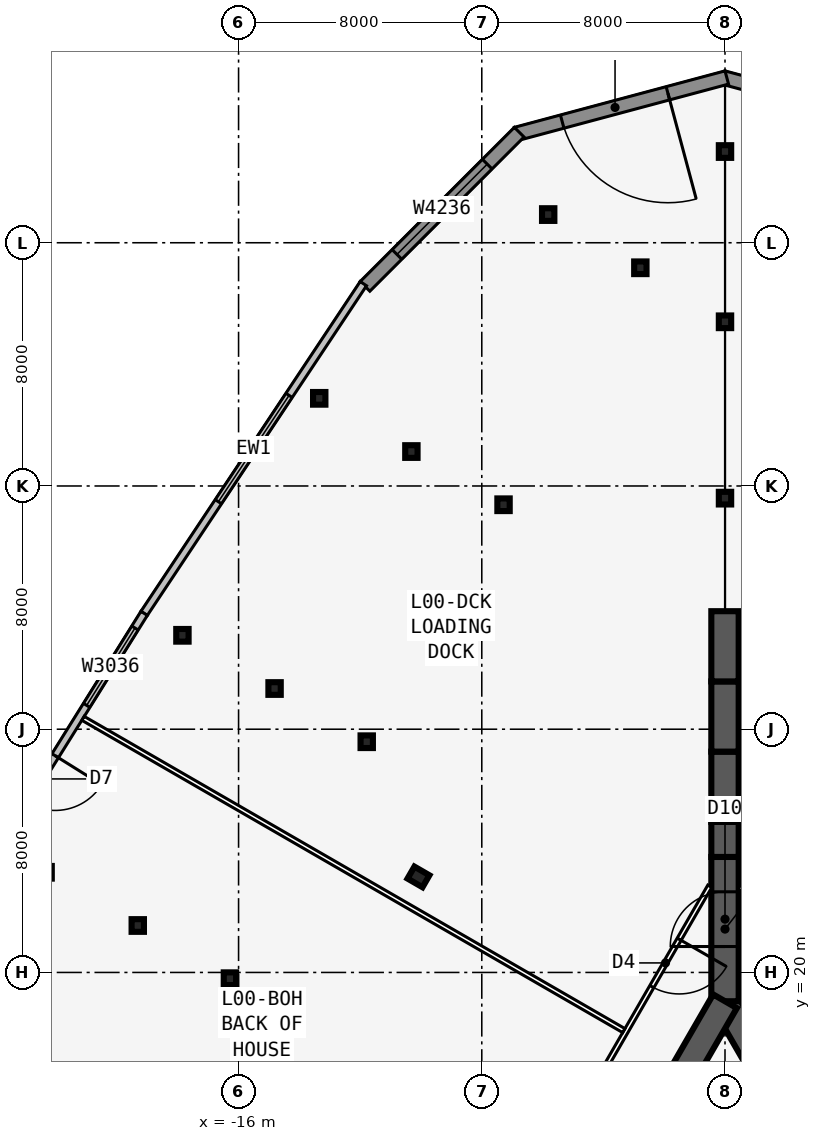
"""IFC4 building model, lengths in metres.
Left out: names, types, materials, properties, quantities, classifications, styles, units other than length and angle.
Written with IfcOpenShell. Run it as: python <this file> out.ifc"""

import sys

from ifc_helpers import new_model, si_unit, direction, frame, frame_2d, origin, origin_2d, place, context, subcontext, project, spatial, rectangle, i_section, extrude, element, fill, save


model = new_model("IFC4")
c1 = context("Model", 3, precision=1e-05, world=origin(), true_north=direction((0.0, 1.0)))
c2 = subcontext(c1, "Body", "Model", "MODEL_VIEW")
j1 = project(units=[si_unit("LENGTHUNIT", "METRE"), si_unit("PLANEANGLEUNIT", "RADIAN")], contexts=[c1])
p1 = place(None, origin())
s1 = spatial("IfcSite", under=j1, at=p1, CompositionType="ELEMENT")
p2 = place(p1, origin())
s2 = spatial("IfcBuilding", under=s1, at=p2, CompositionType="ELEMENT")
p3 = place(p2, origin())
s3 = spatial("IfcBuildingStorey", under=s2, at=p3, CompositionType="ELEMENT", Elevation=0.0)
p4 = place(p3, frame((16.5, -9.526, -0.3), z_axis=(0.0, 0.0, 1.0), x_axis=(-0.499999749417, 0.866025548458, 0.0)))
e1 = element("IfcWall", 1, at=p4, inside=s3, PredefinedType="SHEAR", context=c2, shape_type="SweptSolid", body=[
    extrude(rectangle(XDim=33.0, YDim=0.9, at=frame_2d((16.5, 0.0))), origin(), (0.0, 0.0, 1.0), 6.3),
])
p5 = place(p4, frame((14.15, 0.0, 0.3)))
e2 = element("IfcOpeningElement", 2, at=p5, cuts=e1, PredefinedType="OPENING", context=c2, shape_type="SweptSolid", body=[
    extrude(rectangle(XDim=1.8, YDim=2.13, at=frame_2d((0.9, 1.065))), frame((0.0, 0.46, 0.0), z_axis=(0.0, -1.0, 0.0), x_axis=(1.0, 0.0, 0.0)), (0.0, 0.0, 1.0), 0.92),
])
p6 = place(p4, frame((12.6, 0.0, 0.3)))
e3 = element("IfcOpeningElement", 3, at=p6, cuts=e1, PredefinedType="OPENING", context=c2, shape_type="SweptSolid", body=[
    extrude(rectangle(XDim=1.0, YDim=2.13, at=frame_2d((0.5, 1.065))), frame((0.0, 0.46, 0.0), z_axis=(0.0, -1.0, 0.0), x_axis=(1.0, 0.0, 0.0)), (0.0, 0.0, 1.0), 0.92),
])
p7 = place(p3, frame((0.0, 19.052, -0.3), z_axis=(0.0, 0.0, 1.0), x_axis=(-0.499999749417, -0.866025548458, 0.0)))
e4 = element("IfcWall", 4, at=p7, inside=s3, PredefinedType="SHEAR", context=c2, shape_type="SweptSolid", body=[
    extrude(rectangle(XDim=33.0, YDim=0.9, at=frame_2d((16.5, 0.0))), origin(), (0.0, 0.0, 1.0), 6.3),
])
p8 = place(p7, frame((14.15, 0.0, 0.3)))
e5 = element("IfcOpeningElement", 5, at=p8, cuts=e4, PredefinedType="OPENING", context=c2, shape_type="SweptSolid", body=[
    extrude(rectangle(XDim=1.8, YDim=2.13, at=frame_2d((0.9, 1.065))), frame((0.0, 0.46, 0.0), z_axis=(0.0, -1.0, 0.0), x_axis=(1.0, 0.0, 0.0)), (0.0, 0.0, 1.0), 0.92),
])
p9 = place(p7, frame((12.6, 0.0, 0.3)))
e6 = element("IfcOpeningElement", 6, at=p9, cuts=e4, PredefinedType="OPENING", context=c2, shape_type="SweptSolid", body=[
    extrude(rectangle(XDim=1.0, YDim=2.13, at=frame_2d((0.5, 1.065))), frame((0.0, 0.46, 0.0), z_axis=(0.0, -1.0, 0.0), x_axis=(1.0, 0.0, 0.0)), (0.0, 0.0, 1.0), 0.92),
])
p10 = place(p3, frame((0.0, 19.052, -0.3), z_axis=(0.0, 0.0, 1.0), x_axis=(0.0, 1.0, 0.0)))
e7 = element("IfcWall", 7, at=p10, inside=s3, PredefinedType="SHEAR", context=c2, shape_type="SweptSolid", body=[
    extrude(rectangle(XDim=4.746, YDim=0.9, at=frame_2d((2.373, 0.0))), origin(), (0.0, 0.0, 1.0), 6.3),
])
p11 = place(p10, frame((1.8, 0.0, 0.3)))
e8 = element("IfcOpeningElement", 8, at=p11, cuts=e7, PredefinedType="OPENING", context=c2, shape_type="SweptSolid", body=[
    extrude(rectangle(XDim=1.8, YDim=2.13, at=frame_2d((0.9, 1.065))), frame((0.0, 0.46, 0.0), z_axis=(0.0, -1.0, 0.0), x_axis=(1.0, 0.0, 0.0)), (0.0, 0.0, 1.0), 0.92),
])
p12 = place(p3, frame((0.0, 23.799, -0.3), z_axis=(0.0, 0.0, 1.0), x_axis=(0.0, 1.0, 0.0)))
e9 = element("IfcWall", 9, at=p12, inside=s3, PredefinedType="SHEAR", context=c2, shape_type="SweptSolid", body=[
    extrude(rectangle(XDim=1.155, YDim=0.9, at=frame_2d((0.577, 0.0))), origin(), (0.0, 0.0, 1.0), 6.3),
])
p13 = place(p3, frame((0.0, 24.953, -0.3), z_axis=(0.0, 0.0, 1.0), x_axis=(0.0, 1.0, 0.0)))
e10 = element("IfcWall", 10, at=p13, inside=s3, PredefinedType="SHEAR", context=c2, shape_type="SweptSolid", body=[
    extrude(rectangle(XDim=2.309, YDim=0.9, at=frame_2d((1.155, 0.0))), origin(), (0.0, 0.0, 1.0), 6.3),
])
p14 = place(p3, frame((0.0, 27.263, -0.3), z_axis=(0.0, 0.0, 1.0), x_axis=(0.0, 1.0, 0.0)))
e11 = element("IfcWall", 11, at=p14, inside=s3, PredefinedType="SHEAR", context=c2, shape_type="SweptSolid", body=[
    extrude(rectangle(XDim=2.31, YDim=0.9, at=frame_2d((1.155, 0.0))), origin(), (0.0, 0.0, 1.0), 6.3),
])
p15 = place(p3, frame((0.0, 29.572, -0.3), z_axis=(0.0, 0.0, 1.0), x_axis=(0.0, 1.0, 0.0)))
e12 = element("IfcWall", 12, at=p15, inside=s3, PredefinedType="SHEAR", context=c2, shape_type="SweptSolid", body=[
    extrude(rectangle(XDim=2.309, YDim=0.9, at=frame_2d((1.155, 0.0))), origin(), (0.0, 0.0, 1.0), 6.3),
])
p16 = place(p3, frame((-10.083, 23.142, -0.3), z_axis=(0.0, 0.0, 1.0), x_axis=(-0.5, -0.866025403784, 0.0)))
e13 = element("IfcColumn", 13, at=p16, inside=s3, PredefinedType="COLUMN", context=c2, shape_type="SweptSolid", body=[
    extrude(i_section(OverallWidth=0.455, OverallDepth=0.569, WebThickness=0.078, FlangeThickness=0.125, at=origin_2d()), origin(), (0.0, 0.0, 1.0), 6.3),
])
for number, where, z_axis, x_axis in (
    (14, (0.0, 35.6, -0.3), (0.0, 0.0, 1.0), (1.0, 0.0, 0.0)),
    (15, (0.0, 41.4, -0.3), (0.0, 0.0, 1.0), (1.0, 0.0, 0.0)),
    (16, (0.0, 47.0, -0.3), (0.0, 0.0, 1.0), (1.0, 0.0, 0.0)),
    (17, (-11.785, 27.588, -0.3), (0.0, 0.0, 1.0), (1.0, 0.0, 0.0)),
    (18, (-7.285, 35.383, -0.3), (0.0, 0.0, 1.0), (1.0, 0.0, 0.0)),
    (19, (-2.785, 43.177, -0.3), (0.0, 0.0, 1.0), (1.0, 0.0, 0.0)),
    (20, (-16.285, 19.794, -0.3), (0.0, 0.0, 1.0), (1.0, 0.0, 0.0)),
    (21, (-14.816, 29.338, -0.3), (0.0, 0.0, 1.0), (1.0, 0.0, 0.0)),
    (22, (-10.316, 37.133, -0.3), (0.0, 0.0, 1.0), (1.0, 0.0, 0.0)),
    (23, (-5.816, 44.927, -0.3), (0.0, 0.0, 1.0), (1.0, 0.0, 0.0)),
    (24, (-19.316, 21.544, -0.3), (0.0, 0.0, 1.0), (1.0, 0.0, 0.0)),
    (25, (-17.847, 31.088, -0.3), (0.0, 0.0, 1.0), (1.0, 0.0, 0.0)),
    (26, (-13.347, 38.883, -0.3), (0.0, 0.0, 1.0), (1.0, 0.0, 0.0)),
):
    element("IfcColumn", number, at=place(p3, frame(where, z_axis=z_axis, x_axis=x_axis)), inside=s3, PredefinedType="COLUMN", context=c2, shape_type="SweptSolid", body=[
        extrude(i_section(OverallWidth=0.406, OverallDepth=0.417, WebThickness=0.03, FlangeThickness=0.048, at=origin_2d()), origin(), (0.0, 0.0, 1.0), 6.3),
    ])
p17 = place(p3, frame((6.87, 47.578, -0.3), z_axis=(0.0, 0.0, 1.0), x_axis=(-0.965924653531, 0.258823421857, 0.0)))
e27 = element("IfcWall", 27, at=p17, inside=s3, PredefinedType="SOLIDWALL", context=c2, shape_type="SweptSolid", body=[
    extrude(rectangle(XDim=7.173, YDim=0.45, at=frame_2d((3.586, 0.0))), origin(), (0.0, 0.0, 1.0), 6.05),
])
p18 = place(p17, frame((1.268, 0.0, 1.2)))
e28 = element("IfcOpeningElement", 28, at=p18, cuts=e27, PredefinedType="OPENING", context=c2, shape_type="SweptSolid", body=[
    extrude(rectangle(XDim=4.2, YDim=3.6, at=frame_2d((2.1, 1.8))), frame((0.0, 0.235, 0.0), z_axis=(0.0, -1.0, 0.0), x_axis=(1.0, 0.0, 0.0)), (0.0, 0.0, 1.0), 0.47),
])
p19 = place(p3, frame((0.058, 49.435, -0.3), z_axis=(0.0, 0.0, 1.0), x_axis=(-0.965924653531, -0.258823421857, 0.0)))
e29 = element("IfcWall", 29, at=p19, inside=s3, PredefinedType="SOLIDWALL", context=c2, shape_type="SweptSolid", body=[
    extrude(rectangle(XDim=7.173, YDim=0.45, at=frame_2d((3.586, 0.0))), origin(), (0.0, 0.0, 1.0), 6.05),
])
p20 = place(p19, frame((2.004, 0.0, 0.3)))
e30 = element("IfcOpeningElement", 30, at=p20, cuts=e29, PredefinedType="OPENING", context=c2, shape_type="SweptSolid", body=[
    extrude(rectangle(XDim=3.6, YDim=4.2, at=frame_2d((1.8, 2.1))), frame((0.0, 0.235, 0.0), z_axis=(0.0, -1.0, 0.0), x_axis=(1.0, 0.0, 0.0)), (0.0, 0.0, 1.0), 0.47),
])
p21 = place(p3, frame((-6.769, 47.637, -0.3), z_axis=(0.0, 0.0, 1.0), x_axis=(-0.707089762358, -0.707123799605, 0.0)))
e31 = element("IfcWall", 31, at=p21, inside=s3, PredefinedType="SOLIDWALL", context=c2, shape_type="SweptSolid", body=[
    extrude(rectangle(XDim=7.173, YDim=0.45, at=frame_2d((3.586, 0.0))), origin(), (0.0, 0.0, 1.0), 6.05),
])
p22 = place(p21, frame((1.486, 0.0, 1.2)))
e32 = element("IfcOpeningElement", 32, at=p22, cuts=e31, PredefinedType="OPENING", context=c2, shape_type="SweptSolid", body=[
    extrude(rectangle(XDim=4.2, YDim=3.6, at=frame_2d((2.1, 1.8))), frame((0.0, 0.235, 0.0), z_axis=(0.0, -1.0, 0.0), x_axis=(1.0, 0.0, 0.0)), (0.0, 0.0, 1.0), 0.47),
])
p23 = place(p3, frame((-11.896, 42.655, -0.3), z_axis=(0.0, 0.0, 1.0), x_axis=(-0.553640063994, -0.832756074454, 0.0)))
e33 = element("IfcWall", 33, at=p23, inside=s3, PredefinedType="STANDARD", context=c2, shape_type="SweptSolid", body=[
    extrude(rectangle(XDim=13.026, YDim=0.25, at=frame_2d((6.513, 0.0))), origin(), (0.0, 0.0, 1.0), 6.05),
])
p24 = place(p23, frame((4.413, 0.0, 1.2)))
e34 = element("IfcOpeningElement", 34, at=p24, cuts=e33, PredefinedType="OPENING", context=c2, shape_type="SweptSolid", body=[
    extrude(rectangle(XDim=4.2, YDim=3.6, at=frame_2d((2.1, 1.8))), frame((0.0, 0.135, 0.0), z_axis=(0.0, -1.0, 0.0), x_axis=(1.0, 0.0, 0.0)), (0.0, 0.0, 1.0), 0.27),
])
p25 = place(p3, frame((-19.106, 31.81, -0.3), z_axis=(0.0, 0.0, 1.0), x_axis=(-0.529864906428, -0.848082060261, 0.0)))
e35 = element("IfcWall", 35, at=p25, inside=s3, PredefinedType="STANDARD", context=c2, shape_type="SweptSolid", body=[
    extrude(rectangle(XDim=9.006, YDim=0.25, at=frame_2d((4.503, 0.0))), origin(), (0.0, 0.0, 1.0), 6.05),
])
p26 = place(p25, frame((0.568, 0.0, 1.2)))
e36 = element("IfcOpeningElement", 36, at=p26, cuts=e35, PredefinedType="OPENING", context=c2, shape_type="SweptSolid", body=[
    extrude(rectangle(XDim=3.0, YDim=3.6, at=frame_2d((1.5, 1.8))), frame((0.0, 0.135, 0.0), z_axis=(0.0, -1.0, 0.0), x_axis=(1.0, 0.0, 0.0)), (0.0, 0.0, 1.0), 0.27),
])
p27 = place(p25, frame((5.521, 0.0, 0.3)))
e37 = element("IfcOpeningElement", 37, at=p27, cuts=e35, PredefinedType="OPENING", context=c2, shape_type="SweptSolid", body=[
    extrude(rectangle(XDim=1.8, YDim=2.7, at=frame_2d((0.9, 1.35))), frame((0.0, 0.135, 0.0), z_axis=(0.0, -1.0, 0.0), x_axis=(1.0, 0.0, 0.0)), (0.0, 0.0, 1.0), 0.27),
])
p28 = place(p3, frame((20.027, -10.985, -0.3), z_axis=(0.0, 0.0, 1.0), x_axis=(-0.500001677587, 0.866024435227, 0.0)))
e38 = element("IfcWall", 38, at=p28, inside=s3, PredefinedType="PARTITIONING", context=c2, shape_type="SweptSolid", body=[
    extrude(rectangle(XDim=39.054, YDim=0.15, at=frame_2d((19.527, 0.0))), origin(), (0.0, 0.0, 1.0), 5.108),
])
p29 = place(p28, frame((8.427, 0.0, 0.3)))
e39 = element("IfcOpeningElement", 39, at=p29, cuts=e38, PredefinedType="OPENING", context=c2, shape_type="SweptSolid", body=[
    extrude(rectangle(XDim=1.8, YDim=2.13, at=frame_2d((0.9, 1.065))), frame((0.0, 0.085, 0.0), z_axis=(0.0, -1.0, 0.0), x_axis=(1.0, 0.0, 0.0)), (0.0, 0.0, 1.0), 0.17),
])
p30 = place(p28, frame((18.427, 0.0, 0.3)))
e40 = element("IfcOpeningElement", 40, at=p30, cuts=e38, PredefinedType="OPENING", context=c2, shape_type="SweptSolid", body=[
    extrude(rectangle(XDim=1.8, YDim=2.13, at=frame_2d((0.9, 1.065))), frame((0.0, 0.085, 0.0), z_axis=(0.0, -1.0, 0.0), x_axis=(1.0, 0.0, 0.0)), (0.0, 0.0, 1.0), 0.17),
])
p31 = place(p28, frame((23.227, 0.0, 0.3)))
e41 = element("IfcOpeningElement", 41, at=p31, cuts=e38, PredefinedType="OPENING", context=c2, shape_type="SweptSolid", body=[
    extrude(rectangle(XDim=1.8, YDim=2.13, at=frame_2d((0.9, 1.065))), frame((0.0, 0.085, 0.0), z_axis=(0.0, -1.0, 0.0), x_axis=(1.0, 0.0, 0.0)), (0.0, 0.0, 1.0), 0.17),
])
p32 = place(p28, frame((27.627, 0.0, 0.3)))
e42 = element("IfcOpeningElement", 42, at=p32, cuts=e38, PredefinedType="OPENING", context=c2, shape_type="SweptSolid", body=[
    extrude(rectangle(XDim=1.0, YDim=2.13, at=frame_2d((0.5, 1.065))), frame((0.0, 0.085, 0.0), z_axis=(0.0, -1.0, 0.0), x_axis=(1.0, 0.0, 0.0)), (0.0, 0.0, 1.0), 0.17),
])
p33 = place(p28, frame((30.527, 0.0, 0.3)))
e43 = element("IfcOpeningElement", 43, at=p33, cuts=e38, PredefinedType="OPENING", context=c2, shape_type="SweptSolid", body=[
    extrude(rectangle(XDim=1.0, YDim=2.13, at=frame_2d((0.5, 1.065))), frame((0.0, 0.085, 0.0), z_axis=(0.0, -1.0, 0.0), x_axis=(1.0, 0.0, 0.0)), (0.0, 0.0, 1.0), 0.17),
])
p34 = place(p28, frame((33.277, 0.0, 0.3)))
e44 = element("IfcOpeningElement", 44, at=p34, cuts=e38, PredefinedType="OPENING", context=c2, shape_type="SweptSolid", body=[
    extrude(rectangle(XDim=1.0, YDim=2.13, at=frame_2d((0.5, 1.065))), frame((0.0, 0.085, 0.0), z_axis=(0.0, -1.0, 0.0), x_axis=(1.0, 0.0, 0.0)), (0.0, 0.0, 1.0), 0.17),
])
p35 = place(p28, frame((36.39, 0.0, 0.3)))
e45 = element("IfcOpeningElement", 45, at=p35, cuts=e38, PredefinedType="OPENING", context=c2, shape_type="SweptSolid", body=[
    extrude(rectangle(XDim=1.0, YDim=2.13, at=frame_2d((0.5, 1.065))), frame((0.0, 0.085, 0.0), z_axis=(0.0, -1.0, 0.0), x_axis=(1.0, 0.0, 0.0)), (0.0, 0.0, 1.0), 0.17),
])
p36 = place(p3, frame((-0.5, 22.836, -0.3), z_axis=(0.0, 0.0, 1.0), x_axis=(-0.500001677587, -0.866024435227, 0.0)))
e46 = element("IfcWall", 46, at=p36, inside=s3, PredefinedType="PARTITIONING", context=c2, shape_type="SweptSolid", body=[
    extrude(rectangle(XDim=39.054, YDim=0.15, at=frame_2d((19.527, 0.0))), origin(), (0.0, 0.0, 1.0), 5.108),
])
p37 = place(p36, frame((2.013, 0.0, 0.3)))
e47 = element("IfcOpeningElement", 47, at=p37, cuts=e46, PredefinedType="OPENING", context=c2, shape_type="SweptSolid", body=[
    extrude(rectangle(XDim=1.8, YDim=2.13, at=frame_2d((0.9, 1.065))), frame((0.0, 0.085, 0.0), z_axis=(0.0, -1.0, 0.0), x_axis=(1.0, 0.0, 0.0)), (0.0, 0.0, 1.0), 0.17),
])
p38 = place(p36, frame((10.427, 0.0, 0.3)))
e48 = element("IfcOpeningElement", 48, at=p38, cuts=e46, PredefinedType="OPENING", context=c2, shape_type="SweptSolid", body=[
    extrude(rectangle(XDim=1.8, YDim=2.13, at=frame_2d((0.9, 1.065))), frame((0.0, 0.085, 0.0), z_axis=(0.0, -1.0, 0.0), x_axis=(1.0, 0.0, 0.0)), (0.0, 0.0, 1.0), 0.17),
])
p39 = place(p36, frame((18.427, 0.0, 0.3)))
e49 = element("IfcOpeningElement", 49, at=p39, cuts=e46, PredefinedType="OPENING", context=c2, shape_type="SweptSolid", body=[
    extrude(rectangle(XDim=1.8, YDim=2.13, at=frame_2d((0.9, 1.065))), frame((0.0, 0.085, 0.0), z_axis=(0.0, -1.0, 0.0), x_axis=(1.0, 0.0, 0.0)), (0.0, 0.0, 1.0), 0.17),
])
p40 = place(p36, frame((23.227, 0.0, 0.3)))
e50 = element("IfcOpeningElement", 50, at=p40, cuts=e46, PredefinedType="OPENING", context=c2, shape_type="SweptSolid", body=[
    extrude(rectangle(XDim=1.8, YDim=2.13, at=frame_2d((0.9, 1.065))), frame((0.0, 0.085, 0.0), z_axis=(0.0, -1.0, 0.0), x_axis=(1.0, 0.0, 0.0)), (0.0, 0.0, 1.0), 0.17),
])
p41 = place(p36, frame((27.627, 0.0, 0.3)))
e51 = element("IfcOpeningElement", 51, at=p41, cuts=e46, PredefinedType="OPENING", context=c2, shape_type="SweptSolid", body=[
    extrude(rectangle(XDim=1.0, YDim=2.13, at=frame_2d((0.5, 1.065))), frame((0.0, 0.085, 0.0), z_axis=(0.0, -1.0, 0.0), x_axis=(1.0, 0.0, 0.0)), (0.0, 0.0, 1.0), 0.17),
])
p42 = place(p36, frame((30.277, 0.0, 0.3)))
e52 = element("IfcOpeningElement", 52, at=p42, cuts=e46, PredefinedType="OPENING", context=c2, shape_type="SweptSolid", body=[
    extrude(rectangle(XDim=1.0, YDim=2.13, at=frame_2d((0.5, 1.065))), frame((0.0, 0.085, 0.0), z_axis=(0.0, -1.0, 0.0), x_axis=(1.0, 0.0, 0.0)), (0.0, 0.0, 1.0), 0.17),
])
p43 = place(p36, frame((34.89, 0.0, 0.3)))
e53 = element("IfcOpeningElement", 53, at=p43, cuts=e46, PredefinedType="OPENING", context=c2, shape_type="SweptSolid", body=[
    extrude(rectangle(XDim=1.0, YDim=2.13, at=frame_2d((0.5, 1.065))), frame((0.0, 0.085, 0.0), z_axis=(0.0, -1.0, 0.0), x_axis=(1.0, 0.0, 0.0)), (0.0, 0.0, 1.0), 0.17),
])
p44 = place(p3, frame((-3.329, 18.087, -0.3), z_axis=(0.0, 0.0, 1.0), x_axis=(-0.866020300771, 0.500008838574, 0.0)))
e54 = element("IfcWall", 54, at=p44, inside=s3, PredefinedType="PARTITIONING", context=c2, shape_type="SweptSolid", body=[
    extrude(rectangle(XDim=20.539, YDim=0.15, at=frame_2d((10.27, 0.0))), origin(), (0.0, 0.0, 1.0), 6.05),
])
p45 = place(p3, frame((-9.128, 8.042, -0.3), z_axis=(0.0, 0.0, 1.0), x_axis=(-0.866022493458, 0.5000050408, 0.0)))
e55 = element("IfcWall", 55, at=p45, inside=s3, PredefinedType="PARTITIONING", context=c2, shape_type="SweptSolid", body=[
    extrude(rectangle(XDim=20.79, YDim=0.15, at=frame_2d((10.395, 0.0))), origin(), (0.0, 0.0, 1.0), 6.05),
])
p46 = place(p20, origin())
e56 = element("IfcDoor", 56, at=p46, inside=s3, OperationType="ROLLINGUP", PredefinedType="DOOR", context=c2, shape_type="SweptSolid", body=[
    extrude(rectangle(XDim=3.6, YDim=4.2, at=frame_2d((1.8, 2.1))), frame((0.0, 0.025, 0.0), z_axis=(0.0, -1.0, 0.0), x_axis=(1.0, 0.0, 0.0)), (0.0, 0.0, 1.0), 0.05),
])
fill(e30, e56)
p47 = place(p22, origin())
e57 = element("IfcWindow", 57, at=p47, inside=s3, PartitioningType="SINGLE_PANEL", PredefinedType="WINDOW", context=c2, shape_type="SweptSolid", body=[
    extrude(rectangle(XDim=4.2, YDim=3.6, at=frame_2d((2.1, 1.8))), frame((0.0, 0.03, 0.0), z_axis=(0.0, -1.0, 0.0), x_axis=(1.0, 0.0, 0.0)), (0.0, 0.0, 1.0), 0.06),
])
fill(e32, e57)
p48 = place(p24, origin())
e58 = element("IfcWindow", 58, at=p48, inside=s3, PartitioningType="SINGLE_PANEL", PredefinedType="WINDOW", context=c2, shape_type="SweptSolid", body=[
    extrude(rectangle(XDim=4.2, YDim=3.6, at=frame_2d((2.1, 1.8))), frame((0.0, 0.03, 0.0), z_axis=(0.0, -1.0, 0.0), x_axis=(1.0, 0.0, 0.0)), (0.0, 0.0, 1.0), 0.06),
])
fill(e34, e58)
p49 = place(p26, origin())
e59 = element("IfcWindow", 59, at=p49, inside=s3, PartitioningType="SINGLE_PANEL", PredefinedType="WINDOW", context=c2, shape_type="SweptSolid", body=[
    extrude(rectangle(XDim=3.0, YDim=3.6, at=frame_2d((1.5, 1.8))), frame((0.0, 0.03, 0.0), z_axis=(0.0, -1.0, 0.0), x_axis=(1.0, 0.0, 0.0)), (0.0, 0.0, 1.0), 0.06),
])
fill(e36, e59)
p50 = place(p27, origin())
e60 = element("IfcDoor", 60, at=p50, inside=s3, OperationType="DOUBLE_DOOR_SINGLE_SWING", PredefinedType="DOOR", context=c2, shape_type="SweptSolid", body=[
    extrude(rectangle(XDim=1.8, YDim=2.7, at=frame_2d((0.9, 1.35))), frame((0.0, 0.025, 0.0), z_axis=(0.0, -1.0, 0.0), x_axis=(1.0, 0.0, 0.0)), (0.0, 0.0, 1.0), 0.05),
])
fill(e37, e60)
p51 = place(p37, origin())
e61 = element("IfcDoor", 61, at=p51, inside=s3, OperationType="DOUBLE_DOOR_SINGLE_SWING", PredefinedType="DOOR", context=c2, shape_type="SweptSolid", body=[
    extrude(rectangle(XDim=1.8, YDim=2.13, at=frame_2d((0.9, 1.065))), frame((0.0, 0.025, 0.0), z_axis=(0.0, -1.0, 0.0), x_axis=(1.0, 0.0, 0.0)), (0.0, 0.0, 1.0), 0.05),
])
fill(e47, e61)
p52 = place(p11, origin())
e62 = element("IfcDoor", 62, at=p52, inside=s3, OperationType="DOUBLE_DOOR_DOUBLE_SWING", PredefinedType="DOOR", context=c2, shape_type="SweptSolid", body=[
    extrude(rectangle(XDim=1.8, YDim=2.13, at=frame_2d((0.9, 1.065))), frame((0.0, 0.025, 0.0), z_axis=(0.0, -1.0, 0.0), x_axis=(1.0, 0.0, 0.0)), (0.0, 0.0, 1.0), 0.05),
])
fill(e8, e62)
save(model, sys.argv[1])
